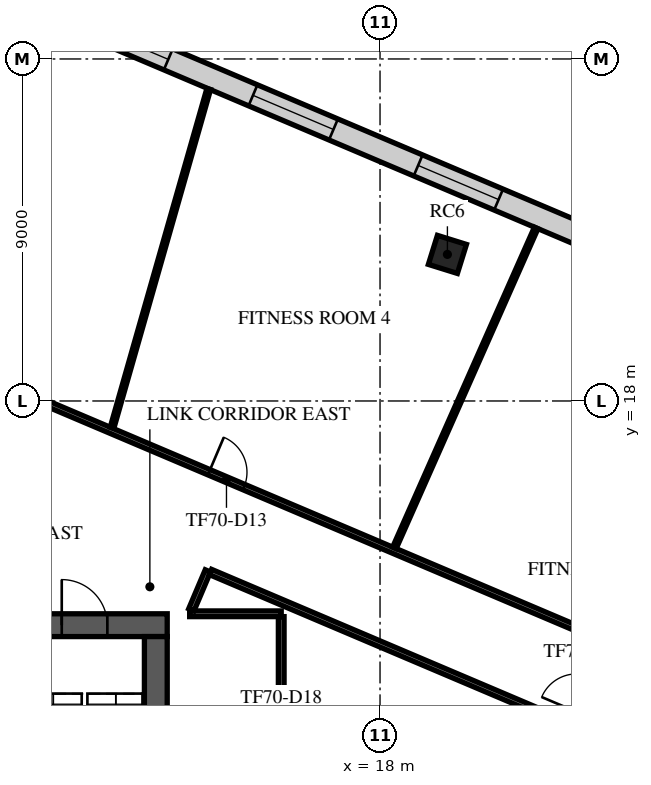
"""IFC4 building model, lengths in metres.
Left out: names, types, materials, properties, quantities, classifications, styles, units other than length and angle.
Written with IfcOpenShell. Run it as: python <this file> out.ifc"""

import sys

from ifc_helpers import new_model, si_unit, direction, frame, frame_2d, origin, origin_2d, place, context, subcontext, project, spatial, rectangle, extrude, element, fill, save


model = new_model("IFC4")
c1 = context("Model", 3, precision=1e-05, world=origin(), true_north=direction((0.0, 1.0)))
c2 = subcontext(c1, "Body", "Model", "MODEL_VIEW")
j1 = project(units=[si_unit("LENGTHUNIT", "METRE"), si_unit("PLANEANGLEUNIT", "RADIAN")], contexts=[c1])
p1 = place(None, origin())
s1 = spatial("IfcSite", under=j1, at=p1, CompositionType="ELEMENT")
p2 = place(p1, origin())
s2 = spatial("IfcBuilding", under=s1, at=p2, CompositionType="ELEMENT")
p3 = place(p2, frame((0.0, 0.0, 296.5)))
s3 = spatial("IfcBuildingStorey", under=s2, at=p3, CompositionType="ELEMENT", Elevation=296.5)
p4 = place(p3, frame((19.773, 21.857, -0.35), z_axis=(0.0, 0.0, 1.0), x_axis=(0.297503182032, 0.954720826567, 0.0)))
e1 = element("IfcColumn", 1, at=p4, inside=s3, PredefinedType="COLUMN", context=c2, shape_type="SweptSolid", body=[
    extrude(rectangle(XDim=0.8, YDim=0.8, at=origin_2d()), origin(), (0.0, 0.0, 1.0), 4.35),
])
p5 = place(p3, frame((-12.4, 12.1, 0.0), z_axis=(0.0, 0.0, 1.0), x_axis=(1.0, 0.0, 0.0)))
e2 = element("IfcWall", 2, at=p5, inside=s3, PredefinedType="SHEAR", context=c2, shape_type="SweptSolid", body=[
    extrude(rectangle(XDim=24.8, YDim=0.6, at=frame_2d((12.4, 0.0))), origin(), (0.0, 0.0, 1.0), 3.65),
])
p6 = place(p5, frame((11.2, 0.0, 0.0)))
e3 = element("IfcOpeningElement", 3, at=p6, cuts=e2, PredefinedType="OPENING", context=c2, shape_type="SweptSolid", body=[
    extrude(rectangle(XDim=2.4, YDim=2.4, at=frame_2d((1.2, 1.2))), frame((0.0, 0.31, 0.0), z_axis=(0.0, -1.0, 0.0), x_axis=(1.0, 0.0, 0.0)), (0.0, 0.0, 1.0), 0.62),
])
p7 = place(p5, frame((22.025, 0.0, 0.0)))
e4 = element("IfcOpeningElement", 4, at=p7, cuts=e2, PredefinedType="OPENING", context=c2, shape_type="SweptSolid", body=[
    extrude(rectangle(XDim=1.2, YDim=2.1, at=frame_2d((0.6, 1.05))), frame((0.0, 0.31, 0.0), z_axis=(0.0, -1.0, 0.0), x_axis=(1.0, 0.0, 0.0)), (0.0, 0.0, 1.0), 0.62),
])
p8 = place(p5, frame((1.0, 0.0, 0.0)))
e5 = element("IfcOpeningElement", 5, at=p8, cuts=e2, PredefinedType="OPENING", context=c2, shape_type="SweptSolid", body=[
    extrude(rectangle(XDim=1.0, YDim=2.1, at=frame_2d((0.5, 1.05))), frame((0.0, 0.31, 0.0), z_axis=(0.0, -1.0, 0.0), x_axis=(1.0, 0.0, 0.0)), (0.0, 0.0, 1.0), 0.62),
])
p9 = place(p3, frame((12.1, -11.8, 0.0), z_axis=(0.0, 0.0, 1.0), x_axis=(0.0, 1.0, 0.0)))
e6 = element("IfcWall", 6, at=p9, inside=s3, PredefinedType="SHEAR", context=c2, shape_type="SweptSolid", body=[
    extrude(rectangle(XDim=23.6, YDim=0.6, at=frame_2d((11.8, 0.0))), origin(), (0.0, 0.0, 1.0), 3.65),
])
p10 = place(p9, frame((10.6, 0.0, 0.0)))
e7 = element("IfcOpeningElement", 7, at=p10, cuts=e6, PredefinedType="OPENING", context=c2, shape_type="SweptSolid", body=[
    extrude(rectangle(XDim=2.4, YDim=2.4, at=frame_2d((1.2, 1.2))), frame((0.0, 0.31, 0.0), z_axis=(0.0, -1.0, 0.0), x_axis=(1.0, 0.0, 0.0)), (0.0, 0.0, 1.0), 0.62),
])
p11 = place(p3, frame((15.204, -32.515, 0.0), z_axis=(0.0, 0.0, 1.0), x_axis=(0.390728997462, 0.920505758017, 0.0)))
e8 = element("IfcWall", 8, at=p11, inside=s3, PredefinedType="STANDARD", context=c2, shape_type="SweptSolid", body=[
    extrude(rectangle(XDim=47.979, YDim=0.6, at=frame_2d((23.99, 0.0))), origin(), (0.0, 0.0, 1.0), 3.65),
])
p12 = place(p11, frame((1.231, 0.0, 0.9)))
e9 = element("IfcOpeningElement", 9, at=p12, cuts=e8, PredefinedType="OPENING", context=c2, shape_type="SweptSolid", body=[
    extrude(rectangle(XDim=1.9, YDim=2.1, at=frame_2d((0.95, 1.05))), frame((0.0, 0.31, 0.0), z_axis=(0.0, -1.0, 0.0), x_axis=(1.0, 0.0, 0.0)), (0.0, 0.0, 1.0), 0.62),
])
p13 = place(p11, frame((5.593, 0.0, 0.9)))
e10 = element("IfcOpeningElement", 10, at=p13, cuts=e8, PredefinedType="OPENING", context=c2, shape_type="SweptSolid", body=[
    extrude(rectangle(XDim=1.9, YDim=2.1, at=frame_2d((0.95, 1.05))), frame((0.0, 0.31, 0.0), z_axis=(0.0, -1.0, 0.0), x_axis=(1.0, 0.0, 0.0)), (0.0, 0.0, 1.0), 0.62),
])
p14 = place(p11, frame((9.954, 0.0, 0.9)))
e11 = element("IfcOpeningElement", 11, at=p14, cuts=e8, PredefinedType="OPENING", context=c2, shape_type="SweptSolid", body=[
    extrude(rectangle(XDim=1.9, YDim=2.1, at=frame_2d((0.95, 1.05))), frame((0.0, 0.31, 0.0), z_axis=(0.0, -1.0, 0.0), x_axis=(1.0, 0.0, 0.0)), (0.0, 0.0, 1.0), 0.62),
])
p15 = place(p11, frame((14.316, 0.0, 0.9)))
e12 = element("IfcOpeningElement", 12, at=p15, cuts=e8, PredefinedType="OPENING", context=c2, shape_type="SweptSolid", body=[
    extrude(rectangle(XDim=1.9, YDim=2.1, at=frame_2d((0.95, 1.05))), frame((0.0, 0.31, 0.0), z_axis=(0.0, -1.0, 0.0), x_axis=(1.0, 0.0, 0.0)), (0.0, 0.0, 1.0), 0.62),
])
p16 = place(p11, frame((18.678, 0.0, 0.9)))
e13 = element("IfcOpeningElement", 13, at=p16, cuts=e8, PredefinedType="OPENING", context=c2, shape_type="SweptSolid", body=[
    extrude(rectangle(XDim=1.9, YDim=2.1, at=frame_2d((0.95, 1.05))), frame((0.0, 0.31, 0.0), z_axis=(0.0, -1.0, 0.0), x_axis=(1.0, 0.0, 0.0)), (0.0, 0.0, 1.0), 0.62),
])
p17 = place(p11, frame((23.04, 0.0, 0.9)))
e14 = element("IfcOpeningElement", 14, at=p17, cuts=e8, PredefinedType="OPENING", context=c2, shape_type="SweptSolid", body=[
    extrude(rectangle(XDim=1.9, YDim=2.1, at=frame_2d((0.95, 1.05))), frame((0.0, 0.31, 0.0), z_axis=(0.0, -1.0, 0.0), x_axis=(1.0, 0.0, 0.0)), (0.0, 0.0, 1.0), 0.62),
])
p18 = place(p11, frame((27.401, 0.0, 0.9)))
e15 = element("IfcOpeningElement", 15, at=p18, cuts=e8, PredefinedType="OPENING", context=c2, shape_type="SweptSolid", body=[
    extrude(rectangle(XDim=1.9, YDim=2.1, at=frame_2d((0.95, 1.05))), frame((0.0, 0.31, 0.0), z_axis=(0.0, -1.0, 0.0), x_axis=(1.0, 0.0, 0.0)), (0.0, 0.0, 1.0), 0.62),
])
p19 = place(p11, frame((31.763, 0.0, 0.9)))
e16 = element("IfcOpeningElement", 16, at=p19, cuts=e8, PredefinedType="OPENING", context=c2, shape_type="SweptSolid", body=[
    extrude(rectangle(XDim=1.9, YDim=2.1, at=frame_2d((0.95, 1.05))), frame((0.0, 0.31, 0.0), z_axis=(0.0, -1.0, 0.0), x_axis=(1.0, 0.0, 0.0)), (0.0, 0.0, 1.0), 0.62),
])
p20 = place(p11, frame((36.125, 0.0, 0.9)))
e17 = element("IfcOpeningElement", 17, at=p20, cuts=e8, PredefinedType="OPENING", context=c2, shape_type="SweptSolid", body=[
    extrude(rectangle(XDim=1.9, YDim=2.1, at=frame_2d((0.95, 1.05))), frame((0.0, 0.31, 0.0), z_axis=(0.0, -1.0, 0.0), x_axis=(1.0, 0.0, 0.0)), (0.0, 0.0, 1.0), 0.62),
])
p21 = place(p11, frame((40.487, 0.0, 0.9)))
e18 = element("IfcOpeningElement", 18, at=p21, cuts=e8, PredefinedType="OPENING", context=c2, shape_type="SweptSolid", body=[
    extrude(rectangle(XDim=1.9, YDim=2.1, at=frame_2d((0.95, 1.05))), frame((0.0, 0.31, 0.0), z_axis=(0.0, -1.0, 0.0), x_axis=(1.0, 0.0, 0.0)), (0.0, 0.0, 1.0), 0.62),
])
p22 = place(p11, frame((44.848, 0.0, 0.9)))
e19 = element("IfcOpeningElement", 19, at=p22, cuts=e8, PredefinedType="OPENING", context=c2, shape_type="SweptSolid", body=[
    extrude(rectangle(XDim=1.9, YDim=2.1, at=frame_2d((0.95, 1.05))), frame((0.0, 0.31, 0.0), z_axis=(0.0, -1.0, 0.0), x_axis=(1.0, 0.0, 0.0)), (0.0, 0.0, 1.0), 0.62),
])
p23 = place(p3, frame((30.926, 19.138, 0.0), z_axis=(0.0, 0.0, 1.0), x_axis=(-0.920504263443, 0.390732518462, 0.0)))
e20 = element("IfcWall", 20, at=p23, inside=s3, PredefinedType="STANDARD", context=c2, shape_type="SweptSolid", body=[
    extrude(rectangle(XDim=42.49, YDim=0.6, at=frame_2d((21.245, 0.0))), origin(), (0.0, 0.0, 1.0), 3.65),
])
p24 = place(p23, frame((1.21, 0.0, 0.9)))
e21 = element("IfcOpeningElement", 21, at=p24, cuts=e20, PredefinedType="OPENING", context=c2, shape_type="SweptSolid", body=[
    extrude(rectangle(XDim=2.3, YDim=2.1, at=frame_2d((1.15, 1.05))), frame((0.0, 0.31, 0.0), z_axis=(0.0, -1.0, 0.0), x_axis=(1.0, 0.0, 0.0)), (0.0, 0.0, 1.0), 0.62),
])
p25 = place(p23, frame((5.932, 0.0, 0.9)))
e22 = element("IfcOpeningElement", 22, at=p25, cuts=e20, PredefinedType="OPENING", context=c2, shape_type="SweptSolid", body=[
    extrude(rectangle(XDim=2.3, YDim=2.1, at=frame_2d((1.15, 1.05))), frame((0.0, 0.31, 0.0), z_axis=(0.0, -1.0, 0.0), x_axis=(1.0, 0.0, 0.0)), (0.0, 0.0, 1.0), 0.62),
])
p26 = place(p23, frame((10.653, 0.0, 0.9)))
e23 = element("IfcOpeningElement", 23, at=p26, cuts=e20, PredefinedType="OPENING", context=c2, shape_type="SweptSolid", body=[
    extrude(rectangle(XDim=2.3, YDim=2.1, at=frame_2d((1.15, 1.05))), frame((0.0, 0.31, 0.0), z_axis=(0.0, -1.0, 0.0), x_axis=(1.0, 0.0, 0.0)), (0.0, 0.0, 1.0), 0.62),
])
p27 = place(p23, frame((15.374, 0.0, 0.9)))
e24 = element("IfcOpeningElement", 24, at=p27, cuts=e20, PredefinedType="OPENING", context=c2, shape_type="SweptSolid", body=[
    extrude(rectangle(XDim=2.3, YDim=2.1, at=frame_2d((1.15, 1.05))), frame((0.0, 0.31, 0.0), z_axis=(0.0, -1.0, 0.0), x_axis=(1.0, 0.0, 0.0)), (0.0, 0.0, 1.0), 0.62),
])
p28 = place(p23, frame((20.095, 0.0, 0.9)))
e25 = element("IfcOpeningElement", 25, at=p28, cuts=e20, PredefinedType="OPENING", context=c2, shape_type="SweptSolid", body=[
    extrude(rectangle(XDim=2.3, YDim=2.1, at=frame_2d((1.15, 1.05))), frame((0.0, 0.31, 0.0), z_axis=(0.0, -1.0, 0.0), x_axis=(1.0, 0.0, 0.0)), (0.0, 0.0, 1.0), 0.62),
])
p29 = place(p23, frame((24.816, 0.0, 0.9)))
e26 = element("IfcOpeningElement", 26, at=p29, cuts=e20, PredefinedType="OPENING", context=c2, shape_type="SweptSolid", body=[
    extrude(rectangle(XDim=2.3, YDim=2.1, at=frame_2d((1.15, 1.05))), frame((0.0, 0.31, 0.0), z_axis=(0.0, -1.0, 0.0), x_axis=(1.0, 0.0, 0.0)), (0.0, 0.0, 1.0), 0.62),
])
p30 = place(p23, frame((29.537, 0.0, 0.9)))
e27 = element("IfcOpeningElement", 27, at=p30, cuts=e20, PredefinedType="OPENING", context=c2, shape_type="SweptSolid", body=[
    extrude(rectangle(XDim=2.3, YDim=2.1, at=frame_2d((1.15, 1.05))), frame((0.0, 0.31, 0.0), z_axis=(0.0, -1.0, 0.0), x_axis=(1.0, 0.0, 0.0)), (0.0, 0.0, 1.0), 0.62),
])
p31 = place(p23, frame((34.258, 0.0, 0.9)))
e28 = element("IfcOpeningElement", 28, at=p31, cuts=e20, PredefinedType="OPENING", context=c2, shape_type="SweptSolid", body=[
    extrude(rectangle(XDim=2.3, YDim=2.1, at=frame_2d((1.15, 1.05))), frame((0.0, 0.31, 0.0), z_axis=(0.0, -1.0, 0.0), x_axis=(1.0, 0.0, 0.0)), (0.0, 0.0, 1.0), 0.62),
])
p32 = place(p23, frame((38.979, 0.0, 0.9)))
e29 = element("IfcOpeningElement", 29, at=p32, cuts=e20, PredefinedType="OPENING", context=c2, shape_type="SweptSolid", body=[
    extrude(rectangle(XDim=2.3, YDim=2.1, at=frame_2d((1.15, 1.05))), frame((0.0, 0.31, 0.0), z_axis=(0.0, -1.0, 0.0), x_axis=(1.0, 0.0, 0.0)), (0.0, 0.0, 1.0), 0.62),
])
p33 = place(p3, frame((-8.176, 25.325, 0.0), z_axis=(0.0, 0.0, 1.0), x_axis=(0.920507643781, -0.390724554821, 0.0)))
e30 = element("IfcWall", 30, at=p33, inside=s3, PredefinedType="PARTITIONING", context=c2, shape_type="SweptSolid", body=[
    extrude(rectangle(XDim=34.917, YDim=0.15, at=frame_2d((17.458, 0.0))), origin(), (0.0, 0.0, 1.0), 3.25),
])
p34 = place(p33, frame((5.55, 0.0, 0.0)))
e31 = element("IfcOpeningElement", 31, at=p34, cuts=e30, PredefinedType="OPENING", context=c2, shape_type="SweptSolid", body=[
    extrude(rectangle(XDim=1.8, YDim=2.1, at=frame_2d((0.9, 1.05))), frame((0.0, 0.085, 0.0), z_axis=(0.0, -1.0, 0.0), x_axis=(1.0, 0.0, 0.0)), (0.0, 0.0, 1.0), 0.17),
])
p35 = place(p33, frame((1.05, 0.0, 0.0)))
e32 = element("IfcOpeningElement", 32, at=p35, cuts=e30, PredefinedType="OPENING", context=c2, shape_type="SweptSolid", body=[
    extrude(rectangle(XDim=1.0, YDim=2.1, at=frame_2d((0.5, 1.05))), frame((0.0, 0.085, 0.0), z_axis=(0.0, -1.0, 0.0), x_axis=(1.0, 0.0, 0.0)), (0.0, 0.0, 1.0), 0.17),
])
p36 = place(p33, frame((16.098, 0.0, 0.0)))
e33 = element("IfcOpeningElement", 33, at=p36, cuts=e30, PredefinedType="OPENING", context=c2, shape_type="SweptSolid", body=[
    extrude(rectangle(XDim=1.0, YDim=2.1, at=frame_2d((0.5, 1.05))), frame((0.0, 0.085, 0.0), z_axis=(0.0, -1.0, 0.0), x_axis=(1.0, 0.0, 0.0)), (0.0, 0.0, 1.0), 0.17),
])
p37 = place(p33, frame((23.547, 0.0, 0.0)))
e34 = element("IfcOpeningElement", 34, at=p37, cuts=e30, PredefinedType="OPENING", context=c2, shape_type="SweptSolid", body=[
    extrude(rectangle(XDim=1.0, YDim=2.1, at=frame_2d((0.5, 1.05))), frame((0.0, 0.085, 0.0), z_axis=(0.0, -1.0, 0.0), x_axis=(1.0, 0.0, 0.0)), (0.0, 0.0, 1.0), 0.17),
])
p38 = place(p3, frame((12.991, 12.4, 0.0), z_axis=(0.0, 0.0, 1.0), x_axis=(1.0, 0.0, 0.0)))
e35 = element("IfcWall", 35, at=p38, inside=s3, PredefinedType="PARTITIONING", context=c2, shape_type="SweptSolid", body=[
    extrude(rectangle(XDim=2.409, YDim=0.15, at=frame_2d((1.205, 0.0))), origin(), (0.0, 0.0, 1.0), 3.13),
])
p39 = place(p3, frame((13.035, 12.504, 0.0), z_axis=(0.0, 0.0, 1.0), x_axis=(0.390634335845, 0.920545933487, 0.0)))
e36 = element("IfcWall", 36, at=p39, inside=s3, PredefinedType="PARTITIONING", context=c2, shape_type="SweptSolid", body=[
    extrude(rectangle(XDim=1.113, YDim=0.15, at=frame_2d((0.557, 0.0))), origin(), (0.0, 0.0, 1.0), 3.13),
])
p40 = place(p3, frame((13.539, 13.5, 0.0), z_axis=(0.0, 0.0, 1.0), x_axis=(0.920505387388, -0.390729870613, 0.0)))
e37 = element("IfcWall", 37, at=p40, inside=s3, PredefinedType="PARTITIONING", context=c2, shape_type="SweptSolid", body=[
    extrude(rectangle(XDim=10.309, YDim=0.15, at=frame_2d((5.154, 0.0))), origin(), (0.0, 0.0, 1.0), 3.25),
])
p41 = place(p3, frame((15.4, -12.4, 0.0), z_axis=(0.0, 0.0, 1.0), x_axis=(0.0, 1.0, 0.0)))
e38 = element("IfcWall", 38, at=p41, inside=s3, PredefinedType="PARTITIONING", context=c2, shape_type="SweptSolid", body=[
    extrude(rectangle(XDim=24.725, YDim=0.15, at=frame_2d((12.362, 0.0))), origin(), (0.0, 0.0, 1.0), 3.25),
])
p42 = place(p41, frame((2.8, 0.0, 0.0)))
e39 = element("IfcOpeningElement", 39, at=p42, cuts=e38, PredefinedType="OPENING", context=c2, shape_type="SweptSolid", body=[
    extrude(rectangle(XDim=1.8, YDim=2.1, at=frame_2d((0.9, 1.05))), frame((0.0, 0.085, 0.0), z_axis=(0.0, -1.0, 0.0), x_axis=(1.0, 0.0, 0.0)), (0.0, 0.0, 1.0), 0.17),
])
p43 = place(p41, frame((10.84, 0.0, 0.0)))
e40 = element("IfcOpeningElement", 40, at=p43, cuts=e38, PredefinedType="OPENING", context=c2, shape_type="SweptSolid", body=[
    extrude(rectangle(XDim=1.8, YDim=2.1, at=frame_2d((0.9, 1.05))), frame((0.0, 0.085, 0.0), z_axis=(0.0, -1.0, 0.0), x_axis=(1.0, 0.0, 0.0)), (0.0, 0.0, 1.0), 0.17),
])
p44 = place(p41, frame((17.59, 0.0, 0.0)))
e41 = element("IfcOpeningElement", 41, at=p44, cuts=e38, PredefinedType="OPENING", context=c2, shape_type="SweptSolid", body=[
    extrude(rectangle(XDim=1.0, YDim=2.1, at=frame_2d((0.5, 1.05))), frame((0.0, 0.085, 0.0), z_axis=(0.0, -1.0, 0.0), x_axis=(1.0, 0.0, 0.0)), (0.0, 0.0, 1.0), 0.17),
])
p45 = place(p41, frame((20.086, 0.0, 0.0)))
e42 = element("IfcOpeningElement", 42, at=p45, cuts=e38, PredefinedType="OPENING", context=c2, shape_type="SweptSolid", body=[
    extrude(rectangle(XDim=1.8, YDim=2.1, at=frame_2d((0.9, 1.05))), frame((0.0, 0.085, 0.0), z_axis=(0.0, -1.0, 0.0), x_axis=(1.0, 0.0, 0.0)), (0.0, 0.0, 1.0), 0.17),
])
p46 = place(p3, frame((23.057, 9.542, 0.0), z_axis=(0.0, 0.0, 1.0), x_axis=(0.390510824394, 0.920598335883, 0.0)))
e43 = element("IfcWall", 43, at=p46, inside=s3, PredefinedType="PARTITIONING", context=c2, shape_type="SweptSolid", body=[
    extrude(rectangle(XDim=2.25, YDim=0.15, at=frame_2d((1.125, 0.0))), origin(), (0.0, 0.0, 1.0), 3.25),
])
p47 = place(p46, frame((0.3, 0.0, 0.0)))
e44 = element("IfcOpeningElement", 44, at=p47, cuts=e43, PredefinedType="OPENING", context=c2, shape_type="SweptSolid", body=[
    extrude(rectangle(XDim=1.0, YDim=2.1, at=frame_2d((0.5, 1.05))), frame((0.0, 0.085, 0.0), z_axis=(0.0, -1.0, 0.0), x_axis=(1.0, 0.0, 0.0)), (0.0, 0.0, 1.0), 0.17),
])
p48 = place(p3, frame((10.948, 17.296, 0.0), z_axis=(0.0, 0.0, 1.0), x_axis=(0.274428926373, 0.961607385771, 0.0)))
e45 = element("IfcWall", 45, at=p48, inside=s3, PredefinedType="PARTITIONING", context=c2, shape_type="SweptSolid", body=[
    extrude(rectangle(XDim=9.27, YDim=0.1, at=frame_2d((4.635, 0.0))), origin(), (0.0, 0.0, 1.0), 3.65),
])
p49 = place(p3, frame((18.379, 14.135, 0.0), z_axis=(0.0, 0.0, 1.0), x_axis=(0.405094962362, 0.91427461491, 0.0)))
e46 = element("IfcWall", 46, at=p49, inside=s3, PredefinedType="PARTITIONING", context=c2, shape_type="SweptSolid", body=[
    extrude(rectangle(XDim=9.207, YDim=0.1, at=frame_2d((4.603, 0.0))), origin(), (0.0, 0.0, 1.0), 3.25),
])
p50 = place(p7, origin())
e47 = element("IfcDoor", 47, at=p50, inside=s3, OperationType="SINGLE_SWING_LEFT", PredefinedType="DOOR", context=c2, shape_type="SweptSolid", body=[
    extrude(rectangle(XDim=1.2, YDim=2.1, at=frame_2d((0.6, 1.05))), frame((0.0, 0.025, 0.0), z_axis=(0.0, -1.0, 0.0), x_axis=(1.0, 0.0, 0.0)), (0.0, 0.0, 1.0), 0.05),
])
fill(e4, e47)
p51 = place(p26, origin())
e48 = element("IfcWindow", 48, at=p51, inside=s3, PartitioningType="SINGLE_PANEL", PredefinedType="WINDOW", context=c2, shape_type="SweptSolid", body=[
    extrude(rectangle(XDim=2.3, YDim=2.1, at=frame_2d((1.15, 1.05))), frame((0.0, 0.03, 0.0), z_axis=(0.0, -1.0, 0.0), x_axis=(1.0, 0.0, 0.0)), (0.0, 0.0, 1.0), 0.06),
])
fill(e23, e48)
p52 = place(p27, origin())
e49 = element("IfcWindow", 49, at=p52, inside=s3, PartitioningType="SINGLE_PANEL", PredefinedType="WINDOW", context=c2, shape_type="SweptSolid", body=[
    extrude(rectangle(XDim=2.3, YDim=2.1, at=frame_2d((1.15, 1.05))), frame((0.0, 0.03, 0.0), z_axis=(0.0, -1.0, 0.0), x_axis=(1.0, 0.0, 0.0)), (0.0, 0.0, 1.0), 0.06),
])
fill(e24, e49)
p53 = place(p28, origin())
e50 = element("IfcWindow", 50, at=p53, inside=s3, PartitioningType="SINGLE_PANEL", PredefinedType="WINDOW", context=c2, shape_type="SweptSolid", body=[
    extrude(rectangle(XDim=2.3, YDim=2.1, at=frame_2d((1.15, 1.05))), frame((0.0, 0.03, 0.0), z_axis=(0.0, -1.0, 0.0), x_axis=(1.0, 0.0, 0.0)), (0.0, 0.0, 1.0), 0.06),
])
fill(e25, e50)
p54 = place(p37, origin())
e51 = element("IfcDoor", 51, at=p54, inside=s3, OperationType="SINGLE_SWING_RIGHT", PredefinedType="DOOR", context=c2, shape_type="SweptSolid", body=[
    extrude(rectangle(XDim=1.0, YDim=2.1, at=frame_2d((0.5, 1.05))), frame((0.0, 0.025, 0.0), z_axis=(0.0, -1.0, 0.0), x_axis=(1.0, 0.0, 0.0)), (0.0, 0.0, 1.0), 0.05),
])
fill(e34, e51)
save(model, sys.argv[1])
